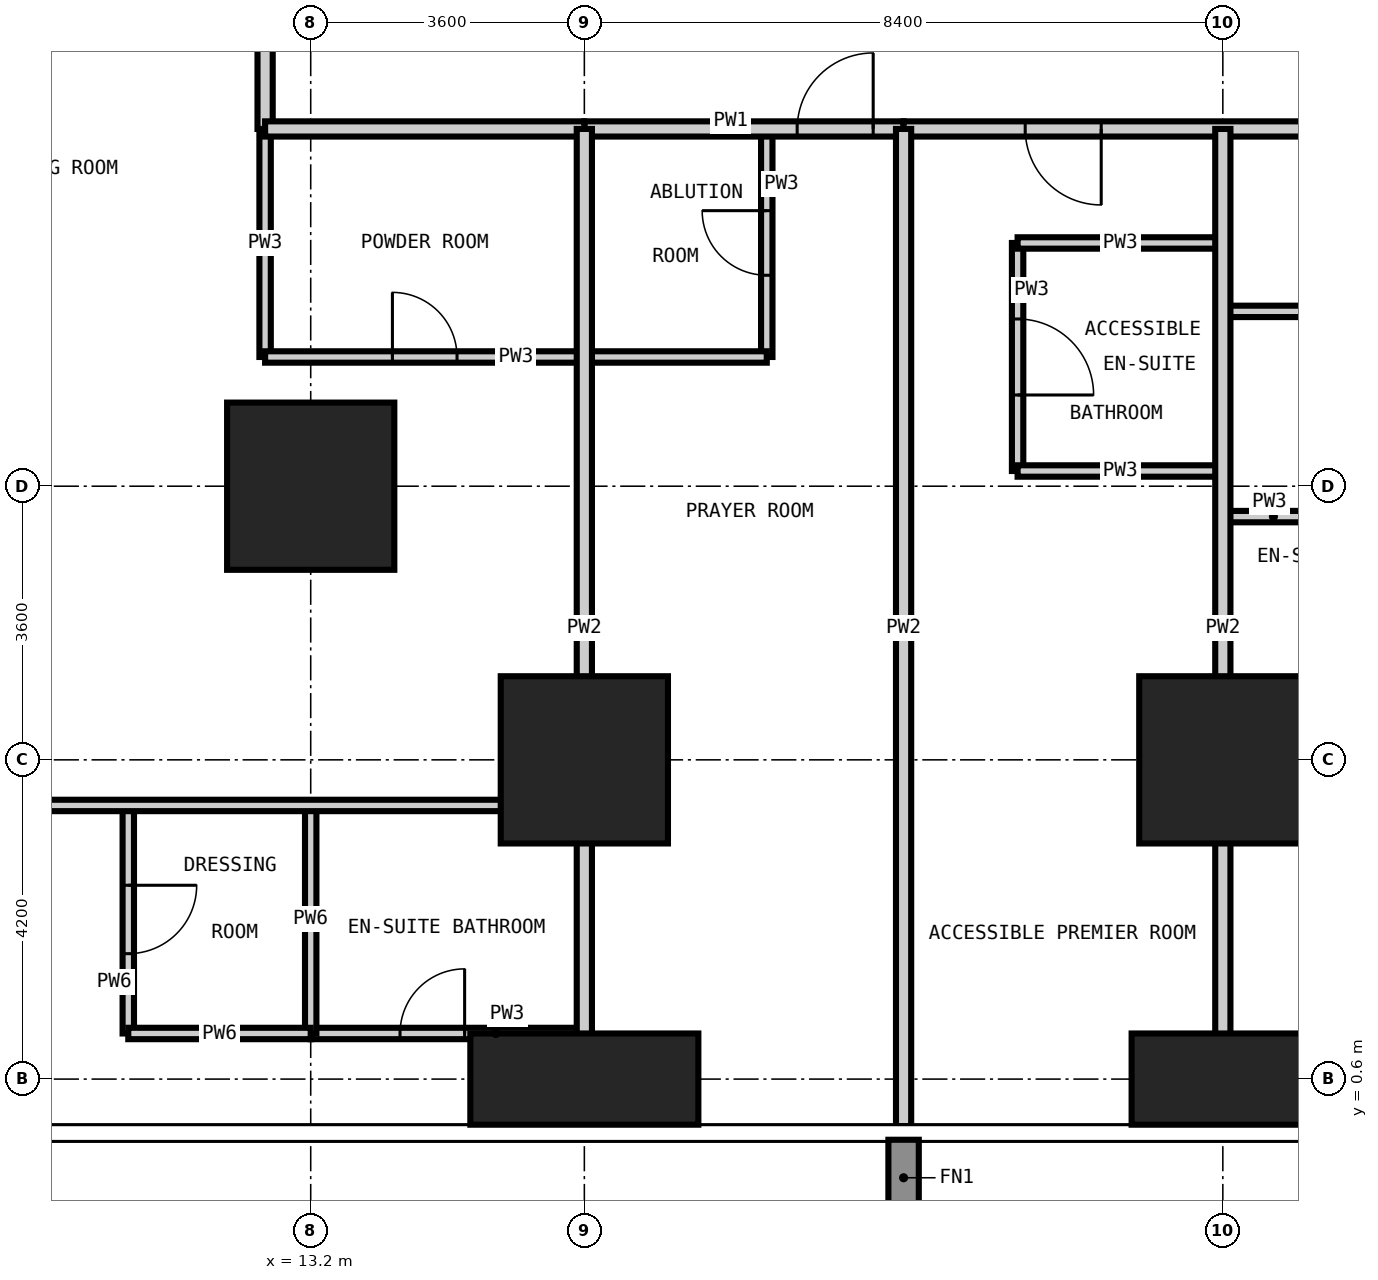
"""IFC4 building model, lengths in metres.
Left out: names, types, materials, properties, quantities, classifications, styles, units other than length and angle.
Written with IfcOpenShell. Run it as: python <this file> out.ifc"""

import sys

from ifc_helpers import new_model, si_unit, direction, frame, frame_2d, origin, origin_2d, place, context, subcontext, project, spatial, rectangle, extrude, element, fill, save


model = new_model("IFC4")
c1 = context("Model", 3, precision=1e-05, world=origin(), true_north=direction((0.0, 1.0)))
c2 = subcontext(c1, "Body", "Model", "MODEL_VIEW")
j1 = project(units=[si_unit("LENGTHUNIT", "METRE"), si_unit("PLANEANGLEUNIT", "RADIAN")], contexts=[c1])
p1 = place(None, origin())
s1 = spatial("IfcSite", under=j1, at=p1, CompositionType="ELEMENT")
p2 = place(p1, origin())
s2 = spatial("IfcBuilding", under=s1, at=p2, CompositionType="ELEMENT")
p3 = place(p2, frame((0.0, 0.0, 144.0)))
s3 = spatial("IfcBuildingStorey", under=s2, at=p3, CompositionType="ELEMENT", Elevation=144.0)
p4 = place(p3, frame((13.2, 8.4, -0.35), z_axis=(0.0, 0.0, 1.0), x_axis=(1.0, 0.0, 0.0)))
e1 = element("IfcColumn", 1, at=p4, inside=s3, PredefinedType="COLUMN", context=c2, shape_type="SweptSolid", body=[
    extrude(rectangle(XDim=2.2, YDim=2.2, at=origin_2d()), origin(), (0.0, 0.0, 1.0), 3.6),
])
p5 = place(p3, frame((16.8, 0.6, -0.35), z_axis=(0.0, 0.0, 1.0), x_axis=(1.0, 0.0, 0.0)))
e2 = element("IfcColumn", 2, at=p5, inside=s3, PredefinedType="COLUMN", context=c2, shape_type="SweptSolid", body=[
    extrude(rectangle(XDim=3.0, YDim=1.2, at=origin_2d()), origin(), (0.0, 0.0, 1.0), 3.6),
])
p6 = place(p3, frame((16.8, 4.8, -0.35), z_axis=(0.0, 0.0, 1.0), x_axis=(1.0, 0.0, 0.0)))
e3 = element("IfcColumn", 3, at=p6, inside=s3, PredefinedType="COLUMN", context=c2, shape_type="SweptSolid", body=[
    extrude(rectangle(XDim=2.2, YDim=2.2, at=origin_2d()), origin(), (0.0, 0.0, 1.0), 3.6),
])
p7 = place(p3, frame((25.2, 0.6, -0.35), z_axis=(0.0, 0.0, 1.0), x_axis=(1.0, 0.0, 0.0)))
e4 = element("IfcColumn", 4, at=p7, inside=s3, PredefinedType="COLUMN", context=c2, shape_type="SweptSolid", body=[
    extrude(rectangle(XDim=2.4, YDim=1.2, at=origin_2d()), origin(), (0.0, 0.0, 1.0), 3.6),
])
p8 = place(p3, frame((25.2, 4.8, -0.35), z_axis=(0.0, 0.0, 1.0), x_axis=(1.0, 0.0, 0.0)))
e5 = element("IfcColumn", 5, at=p8, inside=s3, PredefinedType="COLUMN", context=c2, shape_type="SweptSolid", body=[
    extrude(rectangle(XDim=2.2, YDim=2.2, at=origin_2d()), origin(), (0.0, 0.0, 1.0), 3.6),
])
p9 = place(p3, frame((12.6, 10.1, 0.0), z_axis=(0.0, 0.0, 1.0), x_axis=(0.0, 1.0, 0.0)))
e6 = element("IfcWall", 6, at=p9, inside=s3, PredefinedType="PARTITIONING", context=c2, shape_type="SweptSolid", body=[
    extrude(rectangle(XDim=3.0, YDim=0.15, at=frame_2d((1.5, 0.0))), origin(), (0.0, 0.0, 1.0), 3.25),
])
p10 = place(p3, frame((19.2, 10.1, 0.0), z_axis=(0.0, 0.0, 1.0), x_axis=(0.0, 1.0, 0.0)))
e7 = element("IfcWall", 7, at=p10, inside=s3, PredefinedType="PARTITIONING", context=c2, shape_type="SweptSolid", body=[
    extrude(rectangle(XDim=3.0, YDim=0.15, at=frame_2d((1.5, 0.0))), origin(), (0.0, 0.0, 1.0), 3.25),
])
p11 = place(p10, frame((1.075, 0.0, 0.0)))
e8 = element("IfcOpeningElement", 8, at=p11, cuts=e7, PredefinedType="OPENING", context=c2, shape_type="SweptSolid", body=[
    extrude(rectangle(XDim=0.85, YDim=2.1, at=frame_2d((0.425, 1.05))), frame((0.0, 0.085, 0.0), z_axis=(0.0, -1.0, 0.0), x_axis=(1.0, 0.0, 0.0)), (0.0, 0.0, 1.0), 0.17),
])
p12 = place(p3, frame((22.5, 8.6, 0.0), z_axis=(0.0, 0.0, 1.0), x_axis=(0.0, 1.0, 0.0)))
e9 = element("IfcWall", 9, at=p12, inside=s3, PredefinedType="PARTITIONING", context=c2, shape_type="SweptSolid", body=[
    extrude(rectangle(XDim=3.0, YDim=0.15, at=frame_2d((1.5, 0.0))), origin(), (0.0, 0.0, 1.0), 3.25),
])
p13 = place(p12, frame((1.0, 0.0, 0.0)))
e10 = element("IfcOpeningElement", 10, at=p13, cuts=e9, PredefinedType="OPENING", context=c2, shape_type="SweptSolid", body=[
    extrude(rectangle(XDim=1.0, YDim=2.1, at=frame_2d((0.5, 1.05))), frame((0.0, 0.085, 0.0), z_axis=(0.0, -1.0, 0.0), x_axis=(1.0, 0.0, 0.0)), (0.0, 0.0, 1.0), 0.17),
])
p14 = place(p3, frame((13.2, 1.2, 0.0), z_axis=(0.0, 0.0, 1.0), x_axis=(1.0, 0.0, 0.0)))
e11 = element("IfcWall", 11, at=p14, inside=s3, PredefinedType="PARTITIONING", context=c2, shape_type="SweptSolid", body=[
    extrude(rectangle(XDim=3.6, YDim=0.15, at=frame_2d((1.8, 0.0))), origin(), (0.0, 0.0, 1.0), 3.25),
])
p15 = place(p14, frame((1.175, 0.0, 0.0)))
e12 = element("IfcOpeningElement", 12, at=p15, cuts=e11, PredefinedType="OPENING", context=c2, shape_type="SweptSolid", body=[
    extrude(rectangle(XDim=0.85, YDim=2.1, at=frame_2d((0.425, 1.05))), frame((0.0, 0.085, 0.0), z_axis=(0.0, -1.0, 0.0), x_axis=(1.0, 0.0, 0.0)), (0.0, 0.0, 1.0), 0.17),
])
p16 = place(p3, frame((25.2, 8.0, 0.0), z_axis=(0.0, 0.0, 1.0), x_axis=(1.0, 0.0, 0.0)))
e13 = element("IfcWall", 13, at=p16, inside=s3, PredefinedType="PARTITIONING", context=c2, shape_type="SweptSolid", body=[
    extrude(rectangle(XDim=3.0, YDim=0.15, at=frame_2d((1.5, 0.0))), origin(), (0.0, 0.0, 1.0), 3.25),
])
p17 = place(p16, frame((1.075, 0.0, 0.0)))
e14 = element("IfcOpeningElement", 14, at=p17, cuts=e13, PredefinedType="OPENING", context=c2, shape_type="SweptSolid", body=[
    extrude(rectangle(XDim=0.85, YDim=2.1, at=frame_2d((0.425, 1.05))), frame((0.0, 0.085, 0.0), z_axis=(0.0, -1.0, 0.0), x_axis=(1.0, 0.0, 0.0)), (0.0, 0.0, 1.0), 0.17),
])
p18 = place(p3, frame((22.5, 8.6, 0.0), z_axis=(0.0, 0.0, 1.0), x_axis=(1.0, 0.0, 0.0)))
e15 = element("IfcWall", 15, at=p18, inside=s3, PredefinedType="PARTITIONING", context=c2, shape_type="SweptSolid", body=[
    extrude(rectangle(XDim=2.7, YDim=0.15, at=frame_2d((1.35, 0.0))), origin(), (0.0, 0.0, 1.0), 3.25),
])
p19 = place(p3, frame((12.6, 10.1, 0.0), z_axis=(0.0, 0.0, 1.0), x_axis=(1.0, 0.0, 0.0)))
e16 = element("IfcWall", 16, at=p19, inside=s3, PredefinedType="PARTITIONING", context=c2, shape_type="SweptSolid", body=[
    extrude(rectangle(XDim=6.6, YDim=0.15, at=frame_2d((3.3, 0.0))), origin(), (0.0, 0.0, 1.0), 3.25),
])
p20 = place(p19, frame((1.675, 0.0, 0.0)))
e17 = element("IfcOpeningElement", 17, at=p20, cuts=e16, PredefinedType="OPENING", context=c2, shape_type="SweptSolid", body=[
    extrude(rectangle(XDim=0.85, YDim=2.1, at=frame_2d((0.425, 1.05))), frame((0.0, 0.085, 0.0), z_axis=(0.0, -1.0, 0.0), x_axis=(1.0, 0.0, 0.0)), (0.0, 0.0, 1.0), 0.17),
])
p21 = place(p3, frame((25.2, 10.7, 0.0), z_axis=(0.0, 0.0, 1.0), x_axis=(1.0, 0.0, 0.0)))
e18 = element("IfcWall", 18, at=p21, inside=s3, PredefinedType="PARTITIONING", context=c2, shape_type="SweptSolid", body=[
    extrude(rectangle(XDim=3.0, YDim=0.15, at=frame_2d((1.5, 0.0))), origin(), (0.0, 0.0, 1.0), 3.25),
])
p22 = place(p3, frame((22.5, 11.6, 0.0), z_axis=(0.0, 0.0, 1.0), x_axis=(1.0, 0.0, 0.0)))
e19 = element("IfcWall", 19, at=p22, inside=s3, PredefinedType="PARTITIONING", context=c2, shape_type="SweptSolid", body=[
    extrude(rectangle(XDim=2.7, YDim=0.15, at=frame_2d((1.35, 0.0))), origin(), (0.0, 0.0, 1.0), 3.25),
])
p23 = place(p3, frame((12.6, 13.1, 0.0), z_axis=(0.0, 0.0, 1.0), x_axis=(0.0, 1.0, 0.0)))
e20 = element("IfcWall", 20, at=p23, inside=s3, PredefinedType="PARTITIONING", context=c2, shape_type="SweptSolid", body=[
    extrude(rectangle(XDim=31.4, YDim=0.2, at=frame_2d((15.7, 0.0))), origin(), (0.0, 0.0, 1.0), 3.25),
])
p24 = place(p23, frame((5.3, 0.0, 0.0)))
e21 = element("IfcOpeningElement", 21, at=p24, cuts=e20, PredefinedType="OPENING", context=c2, shape_type="SweptSolid", body=[
    extrude(rectangle(XDim=1.0, YDim=2.2, at=frame_2d((0.5, 1.1))), frame((0.0, 0.11, 0.0), z_axis=(0.0, -1.0, 0.0), x_axis=(1.0, 0.0, 0.0)), (0.0, 0.0, 1.0), 0.22),
])
p25 = place(p23, frame((13.3, 0.0, 0.0)))
e22 = element("IfcOpeningElement", 22, at=p25, cuts=e20, PredefinedType="OPENING", context=c2, shape_type="SweptSolid", body=[
    extrude(rectangle(XDim=1.0, YDim=2.2, at=frame_2d((0.5, 1.1))), frame((0.0, 0.11, 0.0), z_axis=(0.0, -1.0, 0.0), x_axis=(1.0, 0.0, 0.0)), (0.0, 0.0, 1.0), 0.22),
])
p26 = place(p23, frame((18.3, 0.0, 0.0)))
e23 = element("IfcOpeningElement", 23, at=p26, cuts=e20, PredefinedType="OPENING", context=c2, shape_type="SweptSolid", body=[
    extrude(rectangle(XDim=1.0, YDim=2.2, at=frame_2d((0.5, 1.1))), frame((0.0, 0.11, 0.0), z_axis=(0.0, -1.0, 0.0), x_axis=(1.0, 0.0, 0.0)), (0.0, 0.0, 1.0), 0.22),
])
p27 = place(p23, frame((26.3, 0.0, 0.0)))
e24 = element("IfcOpeningElement", 24, at=p27, cuts=e20, PredefinedType="OPENING", context=c2, shape_type="SweptSolid", body=[
    extrude(rectangle(XDim=1.0, YDim=2.2, at=frame_2d((0.5, 1.1))), frame((0.0, 0.11, 0.0), z_axis=(0.0, -1.0, 0.0), x_axis=(1.0, 0.0, 0.0)), (0.0, 0.0, 1.0), 0.22),
])
p28 = place(p23, frame((1.35, 0.0, 0.0)))
e25 = element("IfcOpeningElement", 25, at=p28, cuts=e20, PredefinedType="OPENING", context=c2, shape_type="SweptSolid", body=[
    extrude(rectangle(XDim=1.0, YDim=2.2, at=frame_2d((0.5, 1.1))), frame((0.0, 0.11, 0.0), z_axis=(0.0, -1.0, 0.0), x_axis=(1.0, 0.0, 0.0)), (0.0, 0.0, 1.0), 0.22),
])
p29 = place(p23, frame((30.05, 0.0, 0.0)))
e26 = element("IfcOpeningElement", 26, at=p29, cuts=e20, PredefinedType="OPENING", context=c2, shape_type="SweptSolid", body=[
    extrude(rectangle(XDim=1.0, YDim=2.2, at=frame_2d((0.5, 1.1))), frame((0.0, 0.11, 0.0), z_axis=(0.0, -1.0, 0.0), x_axis=(1.0, 0.0, 0.0)), (0.0, 0.0, 1.0), 0.22),
])
p30 = place(p3, frame((16.8, 13.1, 0.0), z_axis=(0.0, 0.0, 1.0), x_axis=(1.0, 0.0, 0.0)))
e27 = element("IfcWall", 27, at=p30, inside=s3, PredefinedType="PARTITIONING", context=c2, shape_type="SweptSolid", body=[
    extrude(rectangle(XDim=4.2, YDim=0.2, at=frame_2d((2.1, 0.0))), origin(), (0.0, 0.0, 1.0), 3.25),
])
p31 = place(p30, frame((2.8, 0.0, 0.0)))
e28 = element("IfcOpeningElement", 28, at=p31, cuts=e27, PredefinedType="OPENING", context=c2, shape_type="SweptSolid", body=[
    extrude(rectangle(XDim=1.0, YDim=2.2, at=frame_2d((0.5, 1.1))), frame((0.0, 0.11, 0.0), z_axis=(0.0, -1.0, 0.0), x_axis=(1.0, 0.0, 0.0)), (0.0, 0.0, 1.0), 0.22),
])
p32 = place(p3, frame((16.8, 13.1, 0.0), z_axis=(0.0, 0.0, 1.0), x_axis=(-1.0, 0.0, 0.0)))
e29 = element("IfcWall", 29, at=p32, inside=s3, PredefinedType="PARTITIONING", context=c2, shape_type="SweptSolid", body=[
    extrude(rectangle(XDim=4.2, YDim=0.2, at=frame_2d((2.1, 0.0))), origin(), (0.0, 0.0, 1.0), 3.25),
])
p33 = place(p3, frame((45.1, 13.1, 0.0), z_axis=(0.0, 0.0, 1.0), x_axis=(-1.0, 0.0, 0.0)))
e30 = element("IfcWall", 30, at=p33, inside=s3, PredefinedType="PARTITIONING", context=c2, shape_type="SweptSolid", body=[
    extrude(rectangle(XDim=24.1, YDim=0.2, at=frame_2d((12.05, 0.0))), origin(), (0.0, 0.0, 1.0), 3.25),
])
p34 = place(p33, frame((21.5, 0.0, 0.0)))
e31 = element("IfcOpeningElement", 31, at=p34, cuts=e30, PredefinedType="OPENING", context=c2, shape_type="SweptSolid", body=[
    extrude(rectangle(XDim=1.0, YDim=2.2, at=frame_2d((0.5, 1.1))), frame((0.0, 0.11, 0.0), z_axis=(0.0, -1.0, 0.0), x_axis=(1.0, 0.0, 0.0)), (0.0, 0.0, 1.0), 0.22),
])
p35 = place(p33, frame((17.3, 0.0, 0.0)))
e32 = element("IfcOpeningElement", 32, at=p35, cuts=e30, PredefinedType="OPENING", context=c2, shape_type="SweptSolid", body=[
    extrude(rectangle(XDim=1.0, YDim=2.2, at=frame_2d((0.5, 1.1))), frame((0.0, 0.11, 0.0), z_axis=(0.0, -1.0, 0.0), x_axis=(1.0, 0.0, 0.0)), (0.0, 0.0, 1.0), 0.22),
])
p36 = place(p33, frame((11.0, 0.0, 0.0)))
e33 = element("IfcOpeningElement", 33, at=p36, cuts=e30, PredefinedType="OPENING", context=c2, shape_type="SweptSolid", body=[
    extrude(rectangle(XDim=1.0, YDim=2.2, at=frame_2d((0.5, 1.1))), frame((0.0, 0.11, 0.0), z_axis=(0.0, -1.0, 0.0), x_axis=(1.0, 0.0, 0.0)), (0.0, 0.0, 1.0), 0.22),
])
p37 = place(p33, frame((4.7, 0.0, 0.0)))
e34 = element("IfcOpeningElement", 34, at=p37, cuts=e30, PredefinedType="OPENING", context=c2, shape_type="SweptSolid", body=[
    extrude(rectangle(XDim=1.0, YDim=2.2, at=frame_2d((0.5, 1.1))), frame((0.0, 0.11, 0.0), z_axis=(0.0, -1.0, 0.0), x_axis=(1.0, 0.0, 0.0)), (0.0, 0.0, 1.0), 0.22),
])
for number, where, z_axis, x_axis in (
    (35, (16.8, -0.018, 0.0), (0.0, 0.0, 1.0), (0.0, 1.0, 0.0)),
    (36, (21.0, -0.018, 0.0), (0.0, 0.0, 1.0), (0.0, 1.0, 0.0)),
    (37, (25.2, -0.018, 0.0), (0.0, 0.0, 1.0), (0.0, 1.0, 0.0)),
):
    element("IfcWall", number, at=place(p3, frame(where, z_axis=z_axis, x_axis=x_axis)), inside=s3, PredefinedType="PARTITIONING", context=c2, shape_type="SweptSolid", body=[
        extrude(rectangle(XDim=13.118, YDim=0.2, at=frame_2d((6.559, 0.0))), origin(), (0.0, 0.0, 1.0), 3.25),
    ])
p38 = place(p3, frame((10.8, 1.2, 0.0), z_axis=(0.0, 0.0, 1.0), x_axis=(0.0, 1.0, 0.0)))
e38 = element("IfcWall", 38, at=p38, inside=s3, PredefinedType="PARTITIONING", context=c2, shape_type="SweptSolid", body=[
    extrude(rectangle(XDim=3.0, YDim=0.15, at=frame_2d((1.5, 0.0))), origin(), (0.0, 0.0, 1.0), 3.25),
])
p39 = place(p38, frame((1.05, 0.0, 0.0)))
e39 = element("IfcOpeningElement", 39, at=p39, cuts=e38, PredefinedType="OPENING", context=c2, shape_type="SweptSolid", body=[
    extrude(rectangle(XDim=0.9, YDim=2.1, at=frame_2d((0.45, 1.05))), frame((0.0, 0.085, 0.0), z_axis=(0.0, -1.0, 0.0), x_axis=(1.0, 0.0, 0.0)), (0.0, 0.0, 1.0), 0.17),
])
p40 = place(p3, frame((13.2, 1.2, 0.0), z_axis=(0.0, 0.0, 1.0), x_axis=(0.0, 1.0, 0.0)))
e40 = element("IfcWall", 40, at=p40, inside=s3, PredefinedType="PARTITIONING", context=c2, shape_type="SweptSolid", body=[
    extrude(rectangle(XDim=3.0, YDim=0.15, at=frame_2d((1.5, 0.0))), origin(), (0.0, 0.0, 1.0), 3.25),
])
p41 = place(p3, frame((10.8, 1.2, 0.0), z_axis=(0.0, 0.0, 1.0), x_axis=(1.0, 0.0, 0.0)))
e41 = element("IfcWall", 41, at=p41, inside=s3, PredefinedType="PARTITIONING", context=c2, shape_type="SweptSolid", body=[
    extrude(rectangle(XDim=2.4, YDim=0.15, at=frame_2d((1.2, 0.0))), origin(), (0.0, 0.0, 1.0), 3.25),
])
p42 = place(p3, frame((-0.018, 4.2, 0.0), z_axis=(0.0, 0.0, 1.0), x_axis=(1.0, 0.0, 0.0)))
e42 = element("IfcWall", 42, at=p42, inside=s3, PredefinedType="PARTITIONING", context=c2, shape_type="SweptSolid", body=[
    extrude(rectangle(XDim=16.818, YDim=0.15, at=frame_2d((8.409, 0.0))), origin(), (0.0, 0.0, 1.0), 3.25),
])
p43 = place(p42, frame((4.968, 0.0, 0.0)))
e43 = element("IfcOpeningElement", 43, at=p43, cuts=e42, PredefinedType="OPENING", context=c2, shape_type="SweptSolid", body=[
    extrude(rectangle(XDim=0.9, YDim=2.1, at=frame_2d((0.45, 1.05))), frame((0.0, 0.085, 0.0), z_axis=(0.0, -1.0, 0.0), x_axis=(1.0, 0.0, 0.0)), (0.0, 0.0, 1.0), 0.17),
])
p44 = place(p31, origin())
e44 = element("IfcDoor", 44, at=p44, inside=s3, OperationType="SINGLE_SWING_RIGHT", PredefinedType="DOOR", context=c2, shape_type="SweptSolid", body=[
    extrude(rectangle(XDim=1.0, YDim=2.2, at=frame_2d((0.5, 1.1))), frame((0.0, 0.025, 0.0), z_axis=(0.0, -1.0, 0.0), x_axis=(1.0, 0.0, 0.0)), (0.0, 0.0, 1.0), 0.05),
])
fill(e28, e44)
p45 = place(p11, origin())
e45 = element("IfcDoor", 45, at=p45, inside=s3, OperationType="SINGLE_SWING_RIGHT", PredefinedType="DOOR", context=c2, shape_type="SweptSolid", body=[
    extrude(rectangle(XDim=0.85, YDim=2.1, at=frame_2d((0.425, 1.05))), frame((0.0, 0.025, 0.0), z_axis=(0.0, -1.0, 0.0), x_axis=(1.0, 0.0, 0.0)), (0.0, 0.0, 1.0), 0.05),
])
fill(e8, e45)
p46 = place(p34, origin())
e46 = element("IfcDoor", 46, at=p46, inside=s3, OperationType="SINGLE_SWING_LEFT", PredefinedType="DOOR", context=c2, shape_type="SweptSolid", body=[
    extrude(rectangle(XDim=1.0, YDim=2.2, at=frame_2d((0.5, 1.1))), frame((0.0, 0.025, 0.0), z_axis=(0.0, -1.0, 0.0), x_axis=(1.0, 0.0, 0.0)), (0.0, 0.0, 1.0), 0.05),
])
fill(e31, e46)
p47 = place(p13, frame((1.0, 0.0, 0.0), z_axis=(0.0, 0.0, 1.0), x_axis=(-1.0, 0.0, 0.0)))
e47 = element("IfcDoor", 47, at=p47, inside=s3, OperationType="SINGLE_SWING_RIGHT", PredefinedType="DOOR", context=c2, shape_type="SweptSolid", body=[
    extrude(rectangle(XDim=1.0, YDim=2.1, at=frame_2d((0.5, 1.05))), frame((0.0, 0.025, 0.0), z_axis=(0.0, -1.0, 0.0), x_axis=(1.0, 0.0, 0.0)), (0.0, 0.0, 1.0), 0.05),
])
fill(e10, e47)
p48 = place(p20, origin())
e48 = element("IfcDoor", 48, at=p48, inside=s3, OperationType="SINGLE_SWING_LEFT", PredefinedType="DOOR", context=c2, shape_type="SweptSolid", body=[
    extrude(rectangle(XDim=0.85, YDim=2.1, at=frame_2d((0.425, 1.05))), frame((0.0, 0.025, 0.0), z_axis=(0.0, -1.0, 0.0), x_axis=(1.0, 0.0, 0.0)), (0.0, 0.0, 1.0), 0.05),
])
fill(e17, e48)
p49 = place(p15, origin())
e49 = element("IfcDoor", 49, at=p49, inside=s3, OperationType="SINGLE_SWING_RIGHT", PredefinedType="DOOR", context=c2, shape_type="SweptSolid", body=[
    extrude(rectangle(XDim=0.85, YDim=2.1, at=frame_2d((0.425, 1.05))), frame((0.0, 0.025, 0.0), z_axis=(0.0, -1.0, 0.0), x_axis=(1.0, 0.0, 0.0)), (0.0, 0.0, 1.0), 0.05),
])
fill(e12, e49)
p50 = place(p39, frame((0.9, 0.0, 0.0), z_axis=(0.0, 0.0, 1.0), x_axis=(-1.0, 0.0, 0.0)))
e50 = element("IfcDoor", 50, at=p50, inside=s3, OperationType="SINGLE_SWING_LEFT", PredefinedType="DOOR", context=c2, shape_type="SweptSolid", body=[
    extrude(rectangle(XDim=0.9, YDim=2.1, at=frame_2d((0.45, 1.05))), frame((0.0, 0.025, 0.0), z_axis=(0.0, -1.0, 0.0), x_axis=(1.0, 0.0, 0.0)), (0.0, 0.0, 1.0), 0.05),
])
fill(e39, e50)
save(model, sys.argv[1])
